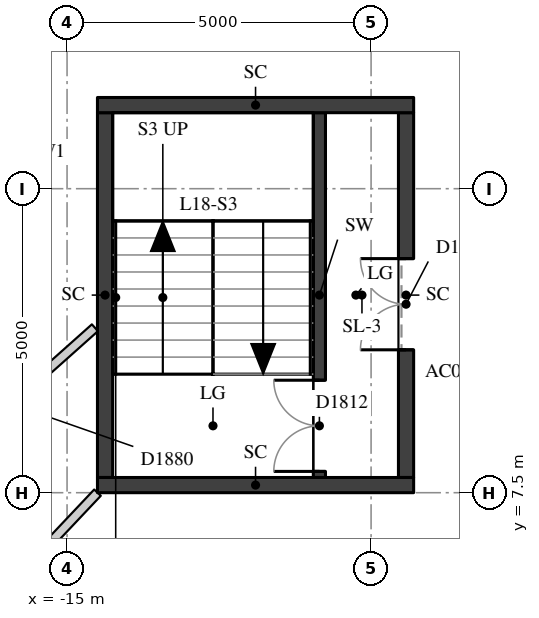
"""IFC4 building model, lengths in metres.
Left out: names, types, materials, properties, quantities, classifications, styles, units other than length and angle.
Written with IfcOpenShell. Run it as: python <this file> out.ifc"""

import sys

from ifc_helpers import new_model, si_unit, direction, frame, frame_2d, origin, place, context, subcontext, project, spatial, rectangle, extrude, element, fill, save


model = new_model("IFC4")
c1 = context("Model", 3, precision=1e-05, world=origin(), true_north=direction((0.0, 1.0)))
c2 = subcontext(c1, "Body", "Model", "MODEL_VIEW")
j1 = project(units=[si_unit("LENGTHUNIT", "METRE"), si_unit("PLANEANGLEUNIT", "RADIAN")], contexts=[c1])
p1 = place(None, origin())
s1 = spatial("IfcSite", under=j1, at=p1, CompositionType="ELEMENT")
p2 = place(p1, origin())
s2 = spatial("IfcBuilding", under=s1, at=p2, CompositionType="ELEMENT")
p3 = place(p2, frame((0.0, 0.0, 67.9)))
s3 = spatial("IfcBuildingStorey", under=s2, at=p3, CompositionType="ELEMENT", Elevation=67.9)
p4 = place(p3, frame((-10.85, 7.75, 0.0), z_axis=(0.0, 0.0, 1.0), x_axis=(0.0, 1.0, 0.0)))
e1 = element("IfcWall", 1, at=p4, inside=s3, PredefinedType="SHEAR", context=c2, shape_type="SweptSolid", body=[
    extrude(rectangle(XDim=6.0, YDim=0.2, at=frame_2d((3.0, 0.0))), origin(), (0.0, 0.0, 1.0), 3.02),
])
p5 = place(p4, frame((0.1, 0.0, 0.0)))
e2 = element("IfcOpeningElement", 2, at=p5, cuts=e1, PredefinedType="OPENING", context=c2, shape_type="SweptSolid", body=[
    extrude(rectangle(XDim=1.5, YDim=2.1, at=frame_2d((0.75, 1.05))), frame((0.0, 0.11, 0.0), z_axis=(0.0, -1.0, 0.0), x_axis=(1.0, 0.0, 0.0)), (0.0, 0.0, 1.0), 0.22),
])
p6 = place(p3, frame((-14.375, 7.75, -0.28), z_axis=(0.0, 0.0, 1.0), x_axis=(0.0, 1.0, 0.0)))
e3 = element("IfcWall", 3, at=p6, inside=s3, PredefinedType="SHEAR", context=c2, shape_type="SweptSolid", body=[
    extrude(rectangle(XDim=6.0, YDim=0.25, at=frame_2d((3.0, 0.0))), origin(), (0.0, 0.0, 1.0), 3.3),
])
p7 = place(p3, frame((-9.425, 7.75, -0.28), z_axis=(0.0, 0.0, 1.0), x_axis=(0.0, 1.0, 0.0)))
e4 = element("IfcWall", 4, at=p7, inside=s3, PredefinedType="SHEAR", context=c2, shape_type="SweptSolid", body=[
    extrude(rectangle(XDim=6.0, YDim=0.25, at=frame_2d((3.0, 0.0))), origin(), (0.0, 0.0, 1.0), 3.3),
])
p8 = place(p7, frame((2.1, 0.0, 0.28)))
e5 = element("IfcOpeningElement", 5, at=p8, cuts=e4, PredefinedType="OPENING", context=c2, shape_type="SweptSolid", body=[
    extrude(rectangle(XDim=1.5, YDim=2.1, at=frame_2d((0.75, 1.05))), frame((0.0, 0.135, 0.0), z_axis=(0.0, -1.0, 0.0), x_axis=(1.0, 0.0, 0.0)), (0.0, 0.0, 1.0), 0.27),
])
for number, where, z_axis, x_axis in (
    (6, (-14.5, 13.875, -0.28), (0.0, 0.0, 1.0), (1.0, 0.0, 0.0)),
    (7, (-14.5, 7.625, -0.28), (0.0, 0.0, 1.0), (1.0, 0.0, 0.0)),
):
    element("IfcWall", number, at=place(p3, frame(where, z_axis=z_axis, x_axis=x_axis)), inside=s3, PredefinedType="SHEAR", context=c2, shape_type="SweptSolid", body=[
        extrude(rectangle(XDim=5.2, YDim=0.25, at=frame_2d((2.6, 0.0))), origin(), (0.0, 0.0, 1.0), 3.3),
    ])
p9 = place(p3, frame((-14.499, 7.501, 0.0), z_axis=(0.0, 0.0, 1.0), x_axis=(-0.686403699782, -0.727220709913, 0.0)))
e8 = element("IfcWall", 8, at=p9, inside=s3, PredefinedType="PARTITIONING", context=c2, shape_type="SweptSolid", body=[
    extrude(rectangle(XDim=6.915, YDim=0.15, at=frame_2d((3.457, 0.0))), origin(), (0.0, 0.0, 1.0), 3.02),
])
p10 = place(p3, frame((-17.185, 7.856, 0.0), z_axis=(0.0, 0.0, 1.0), x_axis=(0.746480516634, 0.665407272493, 0.0)))
e9 = element("IfcWall", 9, at=p10, inside=s3, PredefinedType="PARTITIONING", context=c2, shape_type="SweptSolid", body=[
    extrude(rectangle(XDim=3.541, YDim=0.15, at=frame_2d((1.771, 0.0))), origin(), (0.0, 0.0, 1.0), 3.02),
])
p11 = place(p10, frame((1.221, 0.0, 0.0)))
e10 = element("IfcOpeningElement", 10, at=p11, cuts=e9, PredefinedType="OPENING", context=c2, shape_type="SweptSolid", body=[
    extrude(rectangle(XDim=0.9, YDim=2.1, at=frame_2d((0.45, 1.05))), frame((0.0, 0.085, 0.0), z_axis=(0.0, -1.0, 0.0), x_axis=(1.0, 0.0, 0.0)), (0.0, 0.0, 1.0), 0.17),
])
p12 = place(p5, origin())
e11 = element("IfcDoor", 11, at=p12, inside=s3, OperationType="DOUBLE_DOOR_SINGLE_SWING", PredefinedType="DOOR", context=c2, shape_type="SweptSolid", body=[
    extrude(rectangle(XDim=1.5, YDim=2.1, at=frame_2d((0.75, 1.05))), frame((0.0, 0.025, 0.0), z_axis=(0.0, -1.0, 0.0), x_axis=(1.0, 0.0, 0.0)), (0.0, 0.0, 1.0), 0.05),
])
fill(e2, e11)
p13 = place(p8, origin())
e12 = element("IfcDoor", 12, at=p13, inside=s3, OperationType="DOUBLE_DOOR_SINGLE_SWING", PredefinedType="DOOR", context=c2, shape_type="SweptSolid", body=[
    extrude(rectangle(XDim=1.5, YDim=2.1, at=frame_2d((0.75, 1.05))), frame((0.0, 0.025, 0.0), z_axis=(0.0, -1.0, 0.0), x_axis=(1.0, 0.0, 0.0)), (0.0, 0.0, 1.0), 0.05),
])
fill(e5, e12)
save(model, sys.argv[1])
